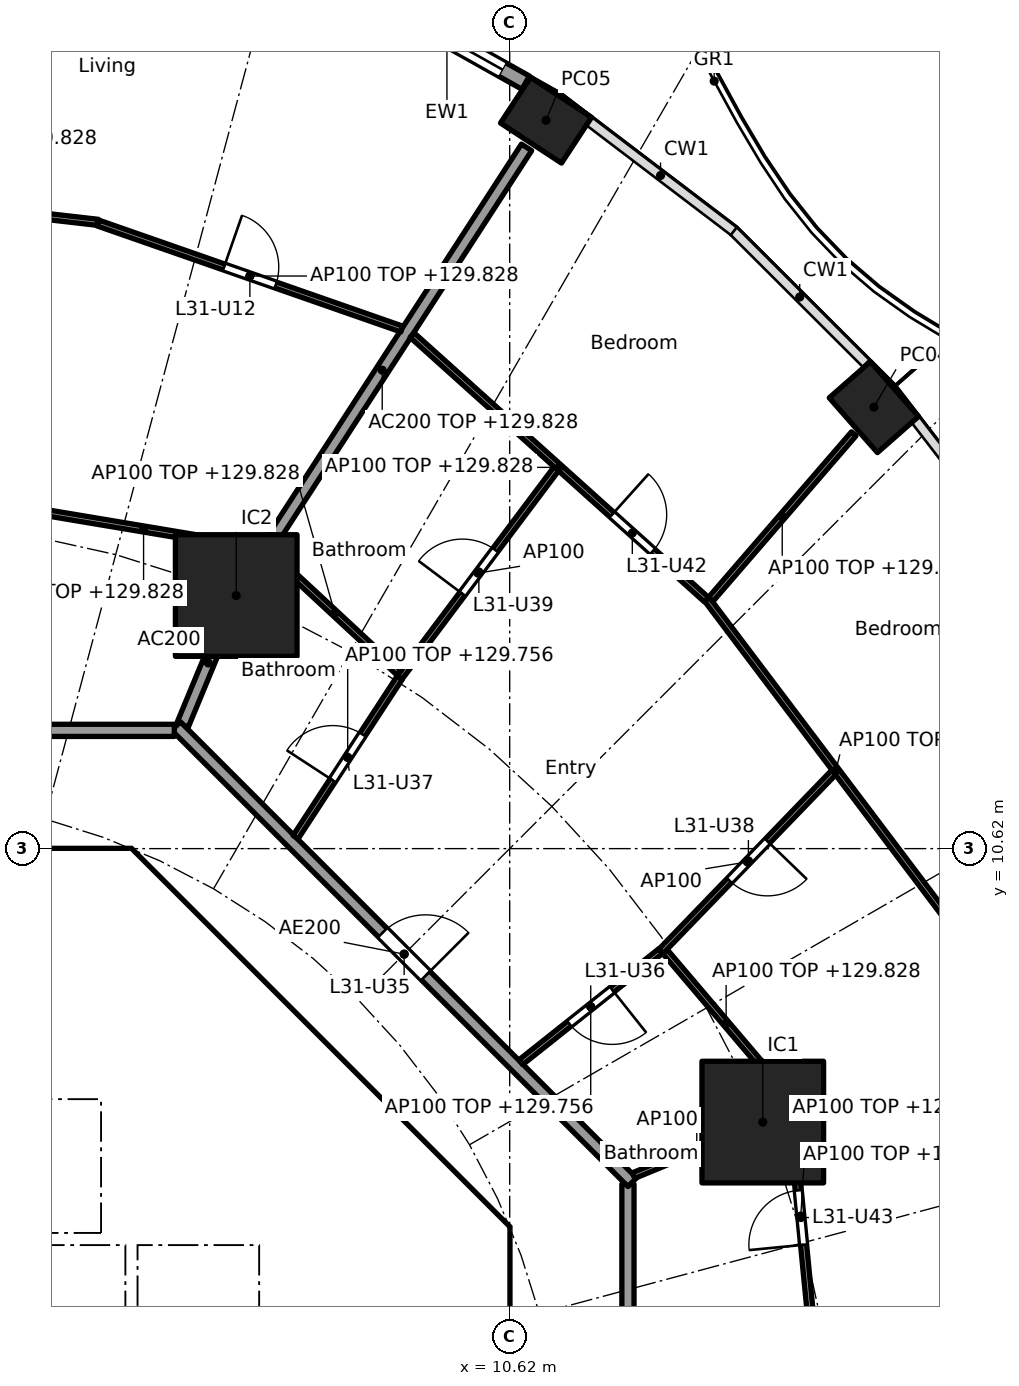
"""IFC4 building model, lengths in metres.
Left out: names, types, materials, properties, quantities, classifications, styles, units other than length and angle.
Written with IfcOpenShell. Run it as: python <this file> out.ifc"""

import sys

from ifc_helpers import new_model, si_unit, direction, frame, frame_2d, origin, origin_2d, place, context, subcontext, project, spatial, polyline, rectangle, hollow_rectangle, outline, extrude, element, fill, save


model = new_model("IFC4")
c1 = context("Model", 3, precision=1e-05, world=origin(), true_north=direction((0.0, 1.0)))
c2 = subcontext(c1, "Body", "Model", "MODEL_VIEW")
j1 = project(units=[si_unit("LENGTHUNIT", "METRE"), si_unit("PLANEANGLEUNIT", "RADIAN")], contexts=[c1])
p1 = place(None, origin())
s1 = spatial("IfcSite", under=j1, at=p1, CompositionType="ELEMENT")
p2 = place(p1, origin())
s2 = spatial("IfcBuilding", under=s1, at=p2, CompositionType="ELEMENT")
p3 = place(p2, frame((0.0, 0.0, 127.0)))
s3 = spatial("IfcBuildingStorey", under=s2, at=p3, CompositionType="ELEMENT", Elevation=127.0)
for number, where, z_axis, x_axis in (
    (1, (16.61, 17.88, 0.0), (0.0, 0.0, 1.0), (-0.66, 0.751, 0.0)),
    (2, (11.218, 22.599, 0.0), (0.0, 0.0, 1.0), (-0.836, 0.549, 0.0)),
):
    element("IfcColumn", number, at=place(p3, frame(where, z_axis=z_axis, x_axis=x_axis)), inside=s3, PredefinedType="COLUMN", context=c2, shape_type="SweptSolid", body=[
        extrude(hollow_rectangle(XDim=1.2, YDim=0.9, WallThickness=0.04, at=origin_2d()), origin(), (0.0, 0.0, 1.0), 3.7),
    ])
for number, where, z_axis, x_axis in (
    (3, (14.782, 6.123, 0.0), (0.0, 0.0, 1.0), (1.0, 0.0, 0.0)),
    (4, (6.123, 14.782, 0.0), (0.0, 0.0, 1.0), (1.0, 0.0, 0.0)),
):
    element("IfcColumn", number, at=place(p3, frame(where, z_axis=z_axis, x_axis=x_axis)), inside=s3, PredefinedType="COLUMN", context=c2, shape_type="SweptSolid", body=[
        extrude(rectangle(XDim=2.0, YDim=2.0, at=origin_2d()), origin(), (0.0, 0.0, 1.0), 3.7),
    ])
p4 = place(p3, frame((8.293, 24.67, 0.0), z_axis=(0.0, 0.0, 1.0), x_axis=(0.87206688547, -0.489386705241, 0.0)))
e5 = element("IfcWall", 5, at=p4, inside=s3, PredefinedType="SOLIDWALL", context=c2, shape_type="SweptSolid", body=[
    extrude(rectangle(XDim=2.97, YDim=0.25, at=frame_2d((1.485, 0.0))), origin(), (0.0, 0.0, 1.0), 3.44),
])
p5 = place(p4, frame((0.435, 0.0, 0.0)))
e6 = element("IfcOpeningElement", 6, at=p5, cuts=e5, PredefinedType="OPENING", context=c2, shape_type="SweptSolid", body=[
    extrude(rectangle(XDim=2.1, YDim=2.4, at=frame_2d((1.05, 1.2))), frame((0.0, 0.135, 0.0), z_axis=(0.0, -1.0, 0.0), x_axis=(1.0, 0.0, 0.0)), (0.0, 0.0, 1.0), 0.27),
])
p6 = place(p3, frame((9.988, 4.613, 0.0), z_axis=(0.0, 0.0, 1.0), x_axis=(-0.707106781187, 0.707106781187, 0.0)))
e7 = element("IfcWall", 7, at=p6, inside=s3, PredefinedType="SHEAR", context=c2, shape_type="SweptSolid", body=[
    extrude(rectangle(XDim=7.602, YDim=0.6, at=frame_2d((3.801, 0.0))), origin(), (0.0, 0.0, 1.0), 3.44),
])
p7 = place(p6, frame((3.201, 0.0, 0.0)))
e8 = element("IfcOpeningElement", 8, at=p7, cuts=e7, PredefinedType="OPENING", context=c2, shape_type="SweptSolid", body=[
    extrude(rectangle(XDim=1.2, YDim=2.1, at=frame_2d((0.6, 1.05))), frame((0.0, 0.31, 0.0), z_axis=(0.0, -1.0, 0.0), x_axis=(1.0, 0.0, 0.0)), (0.0, 0.0, 1.0), 0.62),
])
p8 = place(p3, frame((4.0, 4.3, 0.0), z_axis=(0.0, 0.0, 1.0), x_axis=(0.0, 1.0, 0.0)))
e9 = element("IfcWall", 9, at=p8, inside=s3, PredefinedType="SOLIDWALL", context=c2, shape_type="SweptSolid", body=[
    extrude(rectangle(XDim=2.2, YDim=0.2, at=frame_2d((1.1, 0.0))), origin(), (0.0, 0.0, 1.0), 3.44),
])
p9 = place(p8, frame((0.55, 0.0, 0.0)))
e10 = element("IfcOpeningElement", 10, at=p9, cuts=e9, PredefinedType="OPENING", context=c2, shape_type="SweptSolid", body=[
    extrude(rectangle(XDim=1.1, YDim=2.1, at=frame_2d((0.55, 1.05))), frame((0.0, 0.11, 0.0), z_axis=(0.0, -1.0, 0.0), x_axis=(1.0, 0.0, 0.0)), (0.0, 0.0, 1.0), 0.22),
])
p10 = place(p3, frame((6.7, 4.0, 0.0), z_axis=(0.0, 0.0, 1.0), x_axis=(1.0, 0.0, 0.0)))
e11 = element("IfcWall", 11, at=p10, inside=s3, PredefinedType="SOLIDWALL", context=c2, shape_type="SweptSolid", body=[
    extrude(rectangle(XDim=3.325, YDim=0.2, at=frame_2d((1.662, 0.0))), origin(), (0.0, 0.0, 1.0), 3.44),
])
p11 = place(p10, frame((1.25, 0.0, 0.0)))
e12 = element("IfcOpeningElement", 12, at=p11, cuts=e11, PredefinedType="OPENING", context=c2, shape_type="SweptSolid", body=[
    extrude(rectangle(XDim=1.1, YDim=2.1, at=frame_2d((0.55, 1.05))), frame((0.0, 0.11, 0.0), z_axis=(0.0, -1.0, 0.0), x_axis=(1.0, 0.0, 0.0)), (0.0, 0.0, 1.0), 0.22),
])
p12 = place(p3, frame((4.0, 7.025, 0.0), z_axis=(0.0, 0.0, 1.0), x_axis=(0.0, 1.0, 0.0)))
e13 = element("IfcWall", 13, at=p12, inside=s3, PredefinedType="SOLIDWALL", context=c2, shape_type="SweptSolid", body=[
    extrude(rectangle(XDim=3.0, YDim=0.2, at=frame_2d((1.5, 0.0))), origin(), (0.0, 0.0, 1.0), 3.44),
])
p13 = place(p12, frame((0.925, 0.0, 0.0)))
e14 = element("IfcOpeningElement", 14, at=p13, cuts=e13, PredefinedType="OPENING", context=c2, shape_type="SweptSolid", body=[
    extrude(rectangle(XDim=1.1, YDim=2.1, at=frame_2d((0.55, 1.05))), frame((0.0, 0.11, 0.0), z_axis=(0.0, -1.0, 0.0), x_axis=(1.0, 0.0, 0.0)), (0.0, 0.0, 1.0), 0.22),
])
p14 = place(p3, origin())
e15 = element("IfcWall", 15, at=p14, inside=s3, PredefinedType="SHEAR", context=c2, shape_type="SweptSolid", body=[
    extrude(outline(polyline([(-4.152, 10.025), (-4.401, 9.776), (-4.825, 10.2), (-4.401, 10.625), (4.401, 10.625), (4.825, 10.2), (4.401, 9.776), (4.152, 10.025), (-4.152, 10.025)])), origin(), (0.0, 0.0, 1.0), 3.44),
])
p15 = place(p3, origin())
e16 = element("IfcWall", 16, at=p15, inside=s3, PredefinedType="SHEAR", context=c2, shape_type="SweptSolid", body=[
    extrude(outline(polyline([(9.776, -4.401), (10.025, -4.152), (10.025, -3.801), (10.025, 4.152), (9.776, 4.401), (10.2, 4.825), (10.625, 4.401), (10.625, -4.401), (10.2, -4.825), (9.776, -4.401)])), origin(), (0.0, 0.0, 1.0), 3.44),
])
p16 = place(p3, origin())
e17 = element("IfcWall", 17, at=p16, inside=s3, PredefinedType="SOLIDWALL", context=c2, shape_type="SweptSolid", body=[
    extrude(outline(polyline([(-6.5, 2.1), (-6.7, 2.1), (-6.7, 4.3), (6.7, 4.3), (6.7, 2.1), (6.5, 2.1), (6.5, 4.1), (4.5, 4.1), (4.5, 2.1), (4.3, 2.1), (4.3, 4.1), (2.3, 4.1), (2.3, 2.1), (2.1, 2.1), (2.1, 4.1), (0.1, 4.1), (0.1, 2.1), (-0.1, 2.1), (-0.1, 4.1), (-2.1, 4.1), (-2.1, 2.1), (-2.3, 2.1), (-2.3, 4.1), (-4.3, 4.1), (-4.3, 2.1), (-4.5, 2.1), (-4.5, 4.1), (-6.5, 4.1), (-6.5, 2.1)])), origin(), (0.0, 0.0, 1.0), 3.44),
])
p17 = place(p3, origin())
e18 = element("IfcWall", 18, at=p17, inside=s3, PredefinedType="SOLIDWALL", context=c2, shape_type="SweptSolid", body=[
    extrude(outline(polyline([(4.1, 6.5), (-4.1, 6.5), (-4.1, 7.025), (4.1, 7.025), (4.1, 6.5)])), origin(), (0.0, 0.0, 1.0), 3.44),
])
p18 = place(p3, origin())
e19 = element("IfcWall", 19, at=p18, inside=s3, PredefinedType="SOLIDWALL", context=c2, shape_type="SweptSolid", body=[
    extrude(outline(polyline([(7.025, -3.9), (6.7, -3.9), (6.7, 3.9), (7.025, 3.9), (7.025, -3.9)])), origin(), (0.0, 0.0, 1.0), 3.44),
])
p19 = place(p3, frame((5.243, 12.657, 0.0), z_axis=(0.0, 0.0, 1.0), x_axis=(0.38273085373, 0.923859888513, 0.0)))
e20 = element("IfcWall", 20, at=p19, inside=s3, PredefinedType="PARTITIONING", context=c2, shape_type="SweptSolid", body=[
    extrude(rectangle(XDim=2.199, YDim=0.2, at=frame_2d((1.1, 0.0))), origin(), (0.0, 0.0, 1.0), 3.44),
])
p20 = place(p3, frame((6.15, 14.824, 0.0), z_axis=(0.0, 0.0, 1.0), x_axis=(0.543695254109, 0.839282711998, 0.0)))
e21 = element("IfcWall", 21, at=p20, inside=s3, PredefinedType="PARTITIONING", context=c2, shape_type="SweptSolid", body=[
    extrude(rectangle(XDim=8.731, YDim=0.2, at=frame_2d((4.366, 0.0))), origin(), (0.0, 0.0, 1.0), 2.828),
])
p21 = place(p3, frame((12.565, -5.104, 0.0), z_axis=(0.0, 0.0, 1.0), x_axis=(0.0, 1.0, 0.0)))
e22 = element("IfcWall", 22, at=p21, inside=s3, PredefinedType="PARTITIONING", context=c2, shape_type="SweptSolid", body=[
    extrude(rectangle(XDim=10.209, YDim=0.2, at=frame_2d((5.104, 0.0))), origin(), (0.0, 0.0, 1.0), 3.44),
])
p22 = place(p3, frame((12.635, 5.134, 0.0), z_axis=(0.0, 0.0, 1.0), x_axis=(-0.707106781187, 0.707106781187, 0.0)))
e23 = element("IfcWall", 23, at=p22, inside=s3, PredefinedType="PARTITIONING", context=c2, shape_type="SweptSolid", body=[
    extrude(rectangle(XDim=10.609, YDim=0.2, at=frame_2d((5.305, 0.0))), origin(), (0.0, 0.0, 1.0), 3.44),
])
p23 = place(p22, frame((4.804, 0.0, 0.0)))
e24 = element("IfcOpeningElement", 24, at=p23, cuts=e23, PredefinedType="OPENING", context=c2, shape_type="SweptSolid", body=[
    extrude(rectangle(XDim=1.0, YDim=2.1, at=frame_2d((0.5, 1.05))), frame((0.0, 0.11, 0.0), z_axis=(0.0, -1.0, 0.0), x_axis=(1.0, 0.0, 0.0)), (0.0, 0.0, 1.0), 0.22),
])
p24 = place(p3, frame((5.104, 12.565, 0.0), z_axis=(0.0, 0.0, 1.0), x_axis=(-1.0, 0.0, 0.0)))
e25 = element("IfcWall", 25, at=p24, inside=s3, PredefinedType="PARTITIONING", context=c2, shape_type="SweptSolid", body=[
    extrude(rectangle(XDim=10.409, YDim=0.2, at=frame_2d((5.205, 0.0))), origin(), (0.0, 0.0, 1.0), 3.44),
])
p25 = place(p3, frame((15.602, 2.584, 0.0), z_axis=(0.0, 0.0, 1.0), x_axis=(-0.097216297846, 0.995263277446, 0.0)))
e26 = element("IfcWall", 26, at=p25, inside=s3, PredefinedType="PARTITIONING", context=c2, shape_type="SweptSolid", body=[
    extrude(rectangle(XDim=4.006, YDim=0.1, at=frame_2d((2.003, 0.0))), origin(), (0.0, 0.0, 1.0), 2.828),
])
p26 = place(p25, frame((1.528, 0.0, 0.0)))
e27 = element("IfcOpeningElement", 27, at=p26, cuts=e26, PredefinedType="OPENING", context=c2, shape_type="SweptSolid", body=[
    extrude(rectangle(XDim=0.9, YDim=2.1, at=frame_2d((0.45, 1.05))), frame((0.0, 0.06, 0.0), z_axis=(0.0, -1.0, 0.0), x_axis=(1.0, 0.0, 0.0)), (0.0, 0.0, 1.0), 0.12),
])
p27 = place(p3, frame((12.657, 5.243, 0.0), z_axis=(0.0, 0.0, 1.0), x_axis=(0.923864733477, 0.382719158442, 0.0)))
e28 = element("IfcWall", 28, at=p27, inside=s3, PredefinedType="PARTITIONING", context=c2, shape_type="SweptSolid", body=[
    extrude(rectangle(XDim=2.25, YDim=0.1, at=frame_2d((1.125, 0.0))), origin(), (0.0, 0.0, 1.0), 3.44),
])
p28 = place(p3, frame((15.185, 6.559, 0.0), z_axis=(0.0, 0.0, 1.0), x_axis=(-0.647360926376, 0.762183594026, 0.0)))
e29 = element("IfcWall", 29, at=p28, inside=s3, PredefinedType="PARTITIONING", context=c2, shape_type="SweptSolid", body=[
    extrude(rectangle(XDim=3.106, YDim=0.1, at=frame_2d((1.553, 0.0))), origin(), (0.0, 0.0, 1.0), 2.828),
])
p29 = place(p3, frame((18.106, 9.098, 0.0), z_axis=(0.0, 0.0, 1.0), x_axis=(-0.602398572907, 0.798195439325, 0.0)))
e30 = element("IfcWall", 30, at=p29, inside=s3, PredefinedType="PARTITIONING", context=c2, shape_type="SweptSolid", body=[
    extrude(rectangle(XDim=7.044, YDim=0.1, at=frame_2d((3.522, 0.0))), origin(), (0.0, 0.0, 1.0), 2.828),
])
p30 = place(p3, frame((10.803, 7.107, 0.0), z_axis=(0.0, 0.0, 1.0), x_axis=(0.782908385935, 0.622137010017, 0.0)))
e31 = element("IfcWall", 31, at=p30, inside=s3, PredefinedType="PARTITIONING", context=c2, shape_type="SweptSolid", body=[
    extrude(rectangle(XDim=2.937, YDim=0.1, at=frame_2d((1.469, 0.0))), origin(), (0.0, 0.0, 1.0), 2.756),
])
p31 = place(p30, frame((1.019, 0.0, 0.0)))
e32 = element("IfcOpeningElement", 32, at=p31, cuts=e31, PredefinedType="OPENING", context=c2, shape_type="SweptSolid", body=[
    extrude(rectangle(XDim=0.9, YDim=2.1, at=frame_2d((0.45, 1.05))), frame((0.0, 0.06, 0.0), z_axis=(0.0, -1.0, 0.0), x_axis=(1.0, 0.0, 0.0)), (0.0, 0.0, 1.0), 0.12),
])
p32 = place(p3, frame((13.107, 8.929, 0.0), z_axis=(0.0, 0.0, 1.0), x_axis=(0.694592384931, 0.719403515974, 0.0)))
e33 = element("IfcWall", 33, at=p32, inside=s3, PredefinedType="PARTITIONING", context=c2, shape_type="SweptSolid", body=[
    extrude(rectangle(XDim=4.094, YDim=0.1, at=frame_2d((2.047, 0.0))), origin(), (0.0, 0.0, 1.0), 3.44),
])
p33 = place(p32, frame((1.622, 0.0, 0.0)))
e34 = element("IfcOpeningElement", 34, at=p33, cuts=e33, PredefinedType="OPENING", context=c2, shape_type="SweptSolid", body=[
    extrude(rectangle(XDim=0.9, YDim=2.1, at=frame_2d((0.45, 1.05))), frame((0.0, 0.06, 0.0), z_axis=(0.0, -1.0, 0.0), x_axis=(1.0, 0.0, 0.0)), (0.0, 0.0, 1.0), 0.12),
])
p34 = place(p3, frame((13.926, 14.719, 0.0), z_axis=(0.0, 0.0, 1.0), x_axis=(0.653831857253, 0.756639876323, 0.0)))
e35 = element("IfcWall", 35, at=p34, inside=s3, PredefinedType="PARTITIONING", context=c2, shape_type="SweptSolid", body=[
    extrude(rectangle(XDim=3.598, YDim=0.1, at=frame_2d((1.799, 0.0))), origin(), (0.0, 0.0, 1.0), 2.828),
])
p35 = place(p3, frame((13.856, 14.714, 0.0), z_axis=(0.0, 0.0, 1.0), x_axis=(-0.743799395746, 0.668402916577, 0.0)))
e36 = element("IfcWall", 36, at=p35, inside=s3, PredefinedType="PARTITIONING", context=c2, shape_type="SweptSolid", body=[
    extrude(rectangle(XDim=6.509, YDim=0.1, at=frame_2d((3.254, 0.0))), origin(), (0.0, 0.0, 1.0), 2.828),
])
p36 = place(p35, frame((1.19, 0.0, 0.0)))
e37 = element("IfcOpeningElement", 37, at=p36, cuts=e36, PredefinedType="OPENING", context=c2, shape_type="SweptSolid", body=[
    extrude(rectangle(XDim=0.9, YDim=2.1, at=frame_2d((0.45, 1.05))), frame((0.0, 0.06, 0.0), z_axis=(0.0, -1.0, 0.0), x_axis=(1.0, 0.0, 0.0)), (0.0, 0.0, 1.0), 0.12),
])
p37 = place(p3, frame((7.099, 10.808, 0.0), z_axis=(0.0, 0.0, 1.0), x_axis=(0.546709757921, 0.837322184463, 0.0)))
e38 = element("IfcWall", 38, at=p37, inside=s3, PredefinedType="PARTITIONING", context=c2, shape_type="SweptSolid", body=[
    extrude(rectangle(XDim=3.134, YDim=0.1, at=frame_2d((1.567, 0.0))), origin(), (0.0, 0.0, 1.0), 2.756),
])
p38 = place(p37, frame((1.117, 0.0, 0.0)))
e39 = element("IfcOpeningElement", 39, at=p38, cuts=e38, PredefinedType="OPENING", context=c2, shape_type="SweptSolid", body=[
    extrude(rectangle(XDim=0.9, YDim=2.1, at=frame_2d((0.45, 1.05))), frame((0.0, 0.06, 0.0), z_axis=(0.0, -1.0, 0.0), x_axis=(1.0, 0.0, 0.0)), (0.0, 0.0, 1.0), 0.12),
])
p39 = place(p3, frame((8.81, 13.434, 0.0), z_axis=(0.0, 0.0, 1.0), x_axis=(0.600491337497, 0.799631261014, 0.0)))
e40 = element("IfcWall", 40, at=p39, inside=s3, PredefinedType="PARTITIONING", context=c2, shape_type="SweptSolid", body=[
    extrude(rectangle(XDim=4.292, YDim=0.1, at=frame_2d((2.146, 0.0))), origin(), (0.0, 0.0, 1.0), 3.44),
])
p40 = place(p39, frame((1.721, 0.0, 0.0)))
e41 = element("IfcOpeningElement", 41, at=p40, cuts=e40, PredefinedType="OPENING", context=c2, shape_type="SweptSolid", body=[
    extrude(rectangle(XDim=0.9, YDim=2.1, at=frame_2d((0.45, 1.05))), frame((0.0, 0.06, 0.0), z_axis=(0.0, -1.0, 0.0), x_axis=(1.0, 0.0, 0.0)), (0.0, 0.0, 1.0), 0.12),
])
p41 = place(p3, frame((8.803, 13.508, 0.0), z_axis=(0.0, 0.0, 1.0), x_axis=(-0.733124766325, 0.680094167745, 0.0)))
e42 = element("IfcWall", 42, at=p41, inside=s3, PredefinedType="PARTITIONING", context=c2, shape_type="SweptSolid", body=[
    extrude(rectangle(XDim=2.886, YDim=0.1, at=frame_2d((1.443, 0.0))), origin(), (0.0, 0.0, 1.0), 2.828),
])
p42 = place(p3, frame((6.515, 15.556, 0.0), z_axis=(0.0, 0.0, 1.0), x_axis=(-0.986271328884, 0.16513287323, 0.0)))
e43 = element("IfcWall", 43, at=p42, inside=s3, PredefinedType="PARTITIONING", context=c2, shape_type="SweptSolid", body=[
    extrude(rectangle(XDim=3.884, YDim=0.1, at=frame_2d((1.942, 0.0))), origin(), (0.0, 0.0, 1.0), 2.828),
])
p43 = place(p3, frame((8.846, 19.165, 0.0), z_axis=(0.0, 0.0, 1.0), x_axis=(-0.944186503813, 0.329411362915, 0.0)))
e44 = element("IfcWall", 44, at=p43, inside=s3, PredefinedType="PARTITIONING", context=c2, shape_type="SweptSolid", body=[
    extrude(rectangle(XDim=5.293, YDim=0.1, at=frame_2d((2.646, 0.0))), origin(), (0.0, 0.0, 1.0), 2.828),
])
p44 = place(p43, frame((2.197, 0.0, 0.0)))
e45 = element("IfcOpeningElement", 45, at=p44, cuts=e44, PredefinedType="OPENING", context=c2, shape_type="SweptSolid", body=[
    extrude(rectangle(XDim=0.9, YDim=2.1, at=frame_2d((0.45, 1.05))), frame((0.0, 0.06, 0.0), z_axis=(0.0, -1.0, 0.0), x_axis=(1.0, 0.0, 0.0)), (0.0, 0.0, 1.0), 0.12),
])
p45 = place(p3, frame((3.851, 20.919, 0.0), z_axis=(0.0, 0.0, 1.0), x_axis=(-0.993519908136, 0.11365822512, 0.0)))
e46 = element("IfcWall", 46, at=p45, inside=s3, PredefinedType="PARTITIONING", context=c2, shape_type="SweptSolid", body=[
    extrude(rectangle(XDim=5.613, YDim=0.1, at=frame_2d((2.806, 0.0))), origin(), (0.0, 0.0, 1.0), 2.828),
])
p46 = place(p5, origin())
e47 = element("IfcDoor", 47, at=p46, inside=s3, OperationType="SLIDING_TO_LEFT", PredefinedType="DOOR", context=c2, shape_type="SweptSolid", body=[
    extrude(rectangle(XDim=2.1, YDim=2.4, at=frame_2d((1.05, 1.2))), frame((0.0, 0.025, 0.0), z_axis=(0.0, -1.0, 0.0), x_axis=(1.0, 0.0, 0.0)), (0.0, 0.0, 1.0), 0.05),
])
fill(e6, e47)
p47 = place(p9, origin())
e48 = element("IfcDoor", 48, at=p47, inside=s3, OperationType="DOUBLE_DOOR_SLIDING", PredefinedType="DOOR", context=c2, shape_type="SweptSolid", body=[
    extrude(rectangle(XDim=1.1, YDim=2.1, at=frame_2d((0.55, 1.05))), frame((0.0, 0.025, 0.0), z_axis=(0.0, -1.0, 0.0), x_axis=(1.0, 0.0, 0.0)), (0.0, 0.0, 1.0), 0.05),
])
fill(e10, e48)
p48 = place(p11, frame((1.1, 0.0, 0.0), x_axis=(-1.0, 0.0, 0.0)))
e49 = element("IfcDoor", 49, at=p48, inside=s3, OperationType="SINGLE_SWING_RIGHT", PredefinedType="DOOR", context=c2, shape_type="SweptSolid", body=[
    extrude(rectangle(XDim=1.1, YDim=2.1, at=frame_2d((0.55, 1.05))), frame((0.0, 0.025, 0.0), z_axis=(0.0, -1.0, 0.0), x_axis=(1.0, 0.0, 0.0)), (0.0, 0.0, 1.0), 0.05),
])
fill(e12, e49)
p49 = place(p13, origin())
e50 = element("IfcDoor", 50, at=p49, inside=s3, OperationType="SINGLE_SWING_LEFT", PredefinedType="DOOR", context=c2, shape_type="SweptSolid", body=[
    extrude(rectangle(XDim=1.1, YDim=2.1, at=frame_2d((0.55, 1.05))), frame((0.0, 0.025, 0.0), z_axis=(0.0, -1.0, 0.0), x_axis=(1.0, 0.0, 0.0)), (0.0, 0.0, 1.0), 0.05),
])
fill(e14, e50)
p50 = place(p7, origin())
e51 = element("IfcDoor", 51, at=p50, inside=s3, OperationType="SINGLE_SWING_RIGHT", PredefinedType="DOOR", context=c2, shape_type="SweptSolid", body=[
    extrude(rectangle(XDim=1.2, YDim=2.1, at=frame_2d((0.6, 1.05))), frame((0.0, 0.025, 0.0), z_axis=(0.0, -1.0, 0.0), x_axis=(1.0, 0.0, 0.0)), (0.0, 0.0, 1.0), 0.05),
])
fill(e8, e51)
p51 = place(p44, frame((0.9, 0.0, 0.0), x_axis=(-1.0, 0.0, 0.0)))
e52 = element("IfcDoor", 52, at=p51, inside=s3, OperationType="SINGLE_SWING_LEFT", PredefinedType="DOOR", context=c2, shape_type="SweptSolid", body=[
    extrude(rectangle(XDim=0.9, YDim=2.1, at=frame_2d((0.45, 1.05))), frame((0.0, 0.025, 0.0), z_axis=(0.0, -1.0, 0.0), x_axis=(1.0, 0.0, 0.0)), (0.0, 0.0, 1.0), 0.05),
])
fill(e45, e52)
p52 = place(p23, frame((1.0, 0.0, 0.0), x_axis=(-1.0, 0.0, 0.0)))
e53 = element("IfcDoor", 53, at=p52, inside=s3, OperationType="SINGLE_SWING_RIGHT", PredefinedType="DOOR", context=c2, shape_type="SweptSolid", body=[
    extrude(rectangle(XDim=1.0, YDim=2.1, at=frame_2d((0.5, 1.05))), frame((0.0, 0.025, 0.0), z_axis=(0.0, -1.0, 0.0), x_axis=(1.0, 0.0, 0.0)), (0.0, 0.0, 1.0), 0.05),
])
fill(e24, e53)
p53 = place(p31, frame((0.9, 0.0, 0.0), x_axis=(-1.0, 0.0, 0.0)))
e54 = element("IfcDoor", 54, at=p53, inside=s3, OperationType="SINGLE_SWING_LEFT", PredefinedType="DOOR", context=c2, shape_type="SweptSolid", body=[
    extrude(rectangle(XDim=0.9, YDim=2.1, at=frame_2d((0.45, 1.05))), frame((0.0, 0.025, 0.0), z_axis=(0.0, -1.0, 0.0), x_axis=(1.0, 0.0, 0.0)), (0.0, 0.0, 1.0), 0.05),
])
fill(e32, e54)
p54 = place(p38, origin())
e55 = element("IfcDoor", 55, at=p54, inside=s3, OperationType="SINGLE_SWING_LEFT", PredefinedType="DOOR", context=c2, shape_type="SweptSolid", body=[
    extrude(rectangle(XDim=0.9, YDim=2.1, at=frame_2d((0.45, 1.05))), frame((0.0, 0.025, 0.0), z_axis=(0.0, -1.0, 0.0), x_axis=(1.0, 0.0, 0.0)), (0.0, 0.0, 1.0), 0.05),
])
fill(e39, e55)
p55 = place(p33, frame((0.9, 0.0, 0.0), x_axis=(-1.0, 0.0, 0.0)))
e56 = element("IfcDoor", 56, at=p55, inside=s3, OperationType="SINGLE_SWING_LEFT", PredefinedType="DOOR", context=c2, shape_type="SweptSolid", body=[
    extrude(rectangle(XDim=0.9, YDim=2.1, at=frame_2d((0.45, 1.05))), frame((0.0, 0.025, 0.0), z_axis=(0.0, -1.0, 0.0), x_axis=(1.0, 0.0, 0.0)), (0.0, 0.0, 1.0), 0.05),
])
fill(e34, e56)
p56 = place(p40, origin())
e57 = element("IfcDoor", 57, at=p56, inside=s3, OperationType="SINGLE_SWING_LEFT", PredefinedType="DOOR", context=c2, shape_type="SweptSolid", body=[
    extrude(rectangle(XDim=0.9, YDim=2.1, at=frame_2d((0.45, 1.05))), frame((0.0, 0.025, 0.0), z_axis=(0.0, -1.0, 0.0), x_axis=(1.0, 0.0, 0.0)), (0.0, 0.0, 1.0), 0.05),
])
fill(e41, e57)
p57 = place(p36, frame((0.9, 0.0, 0.0), x_axis=(-1.0, 0.0, 0.0)))
e58 = element("IfcDoor", 58, at=p57, inside=s3, OperationType="SINGLE_SWING_LEFT", PredefinedType="DOOR", context=c2, shape_type="SweptSolid", body=[
    extrude(rectangle(XDim=0.9, YDim=2.1, at=frame_2d((0.45, 1.05))), frame((0.0, 0.025, 0.0), z_axis=(0.0, -1.0, 0.0), x_axis=(1.0, 0.0, 0.0)), (0.0, 0.0, 1.0), 0.05),
])
fill(e37, e58)
p58 = place(p26, origin())
e59 = element("IfcDoor", 59, at=p58, inside=s3, OperationType="SINGLE_SWING_LEFT", PredefinedType="DOOR", context=c2, shape_type="SweptSolid", body=[
    extrude(rectangle(XDim=0.9, YDim=2.1, at=frame_2d((0.45, 1.05))), frame((0.0, 0.025, 0.0), z_axis=(0.0, -1.0, 0.0), x_axis=(1.0, 0.0, 0.0)), (0.0, 0.0, 1.0), 0.05),
])
fill(e27, e59)
save(model, sys.argv[1])
